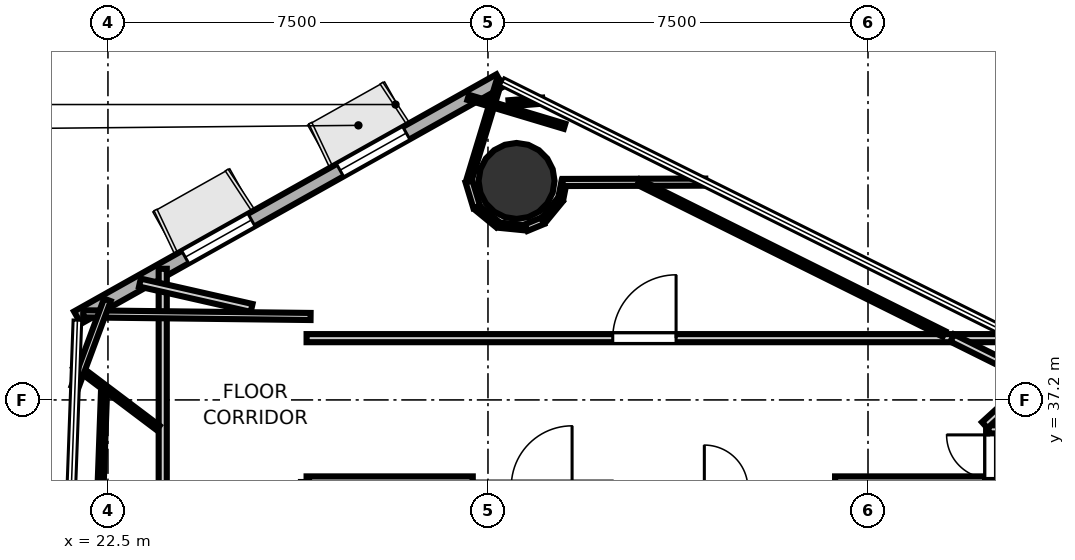
"""IFC4 building model, lengths in metres.
Left out: names, types, materials, properties, quantities, classifications, styles, units other than length and angle.
Written with IfcOpenShell. Run it as: python <this file> out.ifc"""

import sys

from ifc_helpers import new_model, si_unit, direction, frame, frame_2d, origin, origin_2d, place, context, subcontext, project, spatial, rectangle, hollow_circle, extrude, element, fill, save


model = new_model("IFC4")
c1 = context("Model", 3, precision=1e-05, world=origin(), true_north=direction((0.0, 1.0)))
c2 = subcontext(c1, "Body", "Model", "MODEL_VIEW")
j1 = project(units=[si_unit("LENGTHUNIT", "METRE"), si_unit("PLANEANGLEUNIT", "RADIAN")], contexts=[c1])
p1 = place(None, origin())
s1 = spatial("IfcSite", under=j1, at=p1, CompositionType="ELEMENT")
p2 = place(p1, origin())
s2 = spatial("IfcBuilding", under=s1, at=p2, CompositionType="ELEMENT")
p3 = place(p2, frame((0.0, 0.0, 134.8)))
s3 = spatial("IfcBuildingStorey", under=s2, at=p3, CompositionType="ELEMENT", Elevation=134.8)
p4 = place(p3, frame((30.564, 41.521, 0.0), z_axis=(0.0, 0.0, 1.0), x_axis=(1.0, 0.0, 0.0)))
e1 = element("IfcColumn", 1, at=p4, inside=s3, PredefinedType="COLUMN", context=c2, shape_type="SweptSolid", body=[
    extrude(hollow_circle(Radius=0.75, WallThickness=0.036, at=origin_2d()), origin(), (0.0, 0.0, 1.0), 3.7),
])
p5 = place(p3, frame((30.235, 43.503, 0.0), z_axis=(0.0, 0.0, 1.0), x_axis=(-0.872027391353, -0.489457075473, 0.0)))
e2 = element("IfcWall", 2, at=p5, inside=s3, PredefinedType="SOLIDWALL", context=c2, shape_type="SweptSolid", body=[
    extrude(rectangle(XDim=9.559, YDim=0.28, at=frame_2d((4.78, 0.0))), origin(), (0.0, 0.0, 1.0), 3.4),
])
p6 = place(p5, frame((2.118, 0.0, 0.85)))
e3 = element("IfcOpeningElement", 3, at=p6, cuts=e2, PredefinedType="OPENING", context=c2, shape_type="SweptSolid", body=[
    extrude(rectangle(XDim=1.5, YDim=2.1, at=frame_2d((0.75, 1.05))), frame((0.0, 0.15, 0.0), z_axis=(0.0, -1.0, 0.0), x_axis=(1.0, 0.0, 0.0)), (0.0, 0.0, 1.0), 0.3),
])
p7 = place(p5, frame((5.621, 0.0, 0.85)))
e4 = element("IfcOpeningElement", 4, at=p7, cuts=e2, PredefinedType="OPENING", context=c2, shape_type="SweptSolid", body=[
    extrude(rectangle(XDim=1.5, YDim=2.1, at=frame_2d((0.75, 1.05))), frame((0.0, 0.15, 0.0), z_axis=(0.0, -1.0, 0.0), x_axis=(1.0, 0.0, 0.0)), (0.0, 0.0, 1.0), 0.3),
])
p8 = place(p3, frame((39.911, 32.64, 0.0), z_axis=(0.0, 0.0, 1.0), x_axis=(0.0, 1.0, 0.0)))
e5 = element("IfcWall", 5, at=p8, inside=s3, PredefinedType="PARTITIONING", context=c2, shape_type="SweptSolid", body=[
    extrude(rectangle(XDim=4.01, YDim=0.16, at=frame_2d((2.005, 0.0))), origin(), (0.0, 0.0, 1.0), 2.72),
])
p9 = place(p8, frame((3.01, 0.0, 0.0)))
e6 = element("IfcOpeningElement", 6, at=p9, cuts=e5, PredefinedType="OPENING", context=c2, shape_type="SweptSolid", body=[
    extrude(rectangle(XDim=0.86, YDim=2.05, at=frame_2d((0.43, 1.025))), frame((0.0, 0.09, 0.0), z_axis=(0.0, -1.0, 0.0), x_axis=(1.0, 0.0, 0.0)), (0.0, 0.0, 1.0), 0.18),
])
p10 = place(p3, frame((39.88, 36.619, 0.0), z_axis=(0.0, 0.0, 1.0), x_axis=(1.0, 0.0, 0.0)))
e7 = element("IfcWall", 7, at=p10, inside=s3, PredefinedType="PARTITIONING", context=c2, shape_type="SweptSolid", body=[
    extrude(rectangle(XDim=4.223, YDim=0.16, at=frame_2d((2.111, 0.0))), origin(), (0.0, 0.0, 1.0), 2.72),
])
p11 = place(p3, frame((23.581, 28.307, 0.0), z_axis=(0.0, 0.0, 1.0), x_axis=(0.0, 1.0, 0.0)))
e8 = element("IfcWall", 8, at=p11, inside=s3, PredefinedType="PARTITIONING", context=c2, shape_type="SweptSolid", body=[
    extrude(rectangle(XDim=11.481, YDim=0.16, at=frame_2d((5.741, 0.0))), origin(), (0.0, 0.0, 1.0), 2.72),
])
p12 = place(p11, frame((3.909, 0.0, 0.0)))
e9 = element("IfcOpeningElement", 9, at=p12, cuts=e8, PredefinedType="OPENING", context=c2, shape_type="SweptSolid", body=[
    extrude(rectangle(XDim=1.25, YDim=2.2, at=frame_2d((0.625, 1.1))), frame((0.0, 0.09, 0.0), z_axis=(0.0, -1.0, 0.0), x_axis=(1.0, 0.0, 0.0)), (0.0, 0.0, 1.0), 0.18),
])
p13 = place(p3, frame((23.131, 39.515, 0.0), z_axis=(0.0, 0.0, 1.0), x_axis=(0.97520389142, -0.22130831471, 0.0)))
e10 = element("IfcWall", 10, at=p13, inside=s3, PredefinedType="PARTITIONING", context=c2, shape_type="SweptSolid", body=[
    extrude(rectangle(XDim=2.26, YDim=0.16, at=frame_2d((1.13, 0.0))), origin(), (0.0, 0.0, 1.0), 2.72),
])
p14 = place(p3, frame((26.42, 38.419, 0.0), z_axis=(0.0, 0.0, 1.0), x_axis=(1.0, 0.0, 0.0)))
e11 = element("IfcWall", 11, at=p14, inside=s3, PredefinedType="PARTITIONING", context=c2, shape_type="SweptSolid", body=[
    extrude(rectangle(XDim=14.062, YDim=0.16, at=frame_2d((7.031, 0.0))), origin(), (0.0, 0.0, 1.0), 2.72),
])
p15 = place(p14, frame((6.042, 0.0, 0.0)))
e12 = element("IfcOpeningElement", 12, at=p15, cuts=e11, PredefinedType="OPENING", context=c2, shape_type="SweptSolid", body=[
    extrude(rectangle(XDim=1.25, YDim=2.2, at=frame_2d((0.625, 1.1))), frame((0.0, 0.09, 0.0), z_axis=(0.0, -1.0, 0.0), x_axis=(1.0, 0.0, 0.0)), (0.0, 0.0, 1.0), 0.18),
])
p16 = place(p3, frame((39.161, 38.422, 0.0), z_axis=(0.0, 0.0, 1.0), x_axis=(0.895492718696, -0.445076162878, 0.0)))
e13 = element("IfcWall", 13, at=p16, inside=s3, PredefinedType="PARTITIONING", context=c2, shape_type="SweptSolid", body=[
    extrude(rectangle(XDim=1.874, YDim=0.16, at=frame_2d((0.937, 0.0))), origin(), (0.0, 0.0, 1.0), 2.72),
])
p17 = place(p3, frame((41.271, 38.038, 0.0), z_axis=(0.0, 0.0, 1.0), x_axis=(-0.739271241346, -0.673407775214, 0.0)))
e14 = element("IfcWall", 14, at=p17, inside=s3, PredefinedType="PARTITIONING", context=c2, shape_type="SweptSolid", body=[
    extrude(rectangle(XDim=1.983, YDim=0.16, at=frame_2d((0.992, 0.0))), origin(), (0.0, 0.0, 1.0), 2.72),
])
p18 = place(p3, frame((39.818, 35.611, 0.0), z_axis=(0.0, 0.0, 1.0), x_axis=(-1.0, 0.0, 0.0)))
e15 = element("IfcWall", 15, at=p18, inside=s3, PredefinedType="PARTITIONING", context=c2, shape_type="SweptSolid", body=[
    extrude(rectangle(XDim=2.968, YDim=0.16, at=frame_2d((1.484, 0.0))), origin(), (0.0, 0.0, 1.0), 2.72),
])
p19 = place(p3, frame((29.7, 35.611, 0.0), z_axis=(0.0, 0.0, 1.0), x_axis=(-1.0, 0.0, 0.0)))
e16 = element("IfcWall", 16, at=p19, inside=s3, PredefinedType="PARTITIONING", context=c2, shape_type="SweptSolid", body=[
    extrude(rectangle(XDim=3.28, YDim=0.16, at=frame_2d((1.64, 0.0))), origin(), (0.0, 0.0, 1.0), 2.72),
])
p20 = place(p3, frame((26.499, 38.847, 0.0), z_axis=(0.0, 0.0, 1.0), x_axis=(-0.999932203987, 0.011644201537, 0.0)))
e17 = element("IfcWall", 17, at=p20, inside=s3, PredefinedType="PARTITIONING", context=c2, shape_type="SweptSolid", body=[
    extrude(rectangle(XDim=4.487, YDim=0.14, at=frame_2d((2.243, 0.0))), origin(), (0.0, 0.0, 1.0), 2.72),
])
p21 = place(p3, frame((23.489, 36.65, 0.0), z_axis=(0.0, 0.0, 1.0), x_axis=(-0.798656999973, 0.601786503998, 0.0)))
e18 = element("IfcWall", 18, at=p21, inside=s3, PredefinedType="PARTITIONING", context=c2, shape_type="SweptSolid", body=[
    extrude(rectangle(XDim=2.054, YDim=0.105, at=frame_2d((1.027, 0.0))), origin(), (0.0, 0.0, 1.0), 2.72),
])
p22 = place(p3, frame((21.85, 37.456, 0.0), z_axis=(0.0, 0.0, 1.0), x_axis=(0.348320249102, 0.937375593914, 0.0)))
e19 = element("IfcWall", 19, at=p22, inside=s3, PredefinedType="PARTITIONING", context=c2, shape_type="SweptSolid", body=[
    extrude(rectangle(XDim=1.833, YDim=0.14, at=frame_2d((0.917, 0.0))), origin(), (0.0, 0.0, 1.0), 2.72),
])
p23 = place(p3, frame((29.609, 43.171, 0.0), z_axis=(0.0, 0.0, 1.0), x_axis=(0.957836435748, -0.287314048305, 0.0)))
e20 = element("IfcWall", 20, at=p23, inside=s3, PredefinedType="PARTITIONING", context=c2, shape_type="SweptSolid", body=[
    extrude(rectangle(XDim=1.986, YDim=0.105, at=frame_2d((0.993, 0.0))), origin(), (0.0, 0.0, 1.0), 2.72),
])
p24 = place(p3, frame((31.074, 43.106, 0.0), z_axis=(0.0, 0.0, 1.0), x_axis=(-0.996901924198, -0.07865464723, 0.0)))
e21 = element("IfcWall", 21, at=p24, inside=s3, PredefinedType="PARTITIONING", context=c2, shape_type="SweptSolid", body=[
    extrude(rectangle(XDim=0.667, YDim=0.12, at=frame_2d((0.333, 0.0))), origin(), (0.0, 0.0, 1.0), 2.72),
])
p25 = place(p3, frame((30.226, 43.514, 0.0), z_axis=(0.0, 0.0, 1.0), x_axis=(-0.290360314868, -0.956917388049, 0.0)))
e22 = element("IfcWall", 22, at=p25, inside=s3, PredefinedType="PARTITIONING", context=c2, shape_type="SweptSolid", body=[
    extrude(rectangle(XDim=2.073, YDim=0.105, at=frame_2d((1.037, 0.0))), origin(), (0.0, 0.0, 1.0), 2.72),
])
p26 = place(p3, frame((29.624, 41.512, 0.0), z_axis=(0.0, 0.0, 1.0), x_axis=(0.290186937255, -0.956969979386, 0.0)))
e23 = element("IfcWall", 23, at=p26, inside=s3, PredefinedType="PARTITIONING", context=c2, shape_type="SweptSolid", body=[
    extrude(rectangle(XDim=0.528, YDim=0.14, at=frame_2d((0.264, 0.0))), origin(), (0.0, 0.0, 1.0), 2.72),
])
p27 = place(p3, frame((29.788, 40.991, 0.0), z_axis=(0.0, 0.0, 1.0), x_axis=(0.773009460249, -0.634394494275, 0.0)))
e24 = element("IfcWall", 24, at=p27, inside=s3, PredefinedType="PARTITIONING", context=c2, shape_type="SweptSolid", body=[
    extrude(rectangle(XDim=0.528, YDim=0.12, at=frame_2d((0.264, 0.0))), origin(), (0.0, 0.0, 1.0), 2.72),
])
p28 = place(p3, frame((30.213, 40.649, 0.0), z_axis=(0.0, 0.0, 1.0), x_axis=(0.995191506225, -0.09794828195, 0.0)))
e25 = element("IfcWall", 25, at=p28, inside=s3, PredefinedType="PARTITIONING", context=c2, shape_type="SweptSolid", body=[
    extrude(rectangle(XDim=0.528, YDim=0.105, at=frame_2d((0.264, 0.0))), origin(), (0.0, 0.0, 1.0), 2.72),
])
p29 = place(p3, frame((30.753, 40.6, 0.0), z_axis=(0.0, 0.0, 1.0), x_axis=(0.923949766891, 0.382513827544, 0.0)))
e26 = element("IfcWall", 26, at=p29, inside=s3, PredefinedType="PARTITIONING", context=c2, shape_type="SweptSolid", body=[
    extrude(rectangle(XDim=0.355, YDim=0.14, at=frame_2d((0.177, 0.0))), origin(), (0.0, 0.0, 1.0), 2.72),
])
p30 = place(p3, frame((31.094, 40.745, 0.0), z_axis=(0.0, 0.0, 1.0), x_axis=(0.634394494275, 0.773009460249, 0.0)))
e27 = element("IfcWall", 27, at=p30, inside=s3, PredefinedType="PARTITIONING", context=c2, shape_type="SweptSolid", body=[
    extrude(rectangle(XDim=0.528, YDim=0.12, at=frame_2d((0.264, 0.0))), origin(), (0.0, 0.0, 1.0), 2.72),
])
p31 = place(p3, frame((31.435, 41.167, 0.0), z_axis=(0.0, 0.0, 1.0), x_axis=(0.19466594417, 0.980869598968, 0.0)))
e28 = element("IfcWall", 28, at=p31, inside=s3, PredefinedType="PARTITIONING", context=c2, shape_type="SweptSolid", body=[
    extrude(rectangle(XDim=0.356, YDim=0.105, at=frame_2d((0.178, 0.0))), origin(), (0.0, 0.0, 1.0), 2.72),
])
p32 = place(p3, frame((31.474, 41.491, 0.0), z_axis=(0.0, 0.0, 1.0), x_axis=(0.99999683476, 0.002516042704, 0.0)))
e29 = element("IfcWall", 29, at=p32, inside=s3, PredefinedType="PARTITIONING", context=c2, shape_type="SweptSolid", body=[
    extrude(rectangle(XDim=2.814, YDim=0.14, at=frame_2d((1.407, 0.0))), origin(), (0.0, 0.0, 1.0), 2.72),
])
p33 = place(p3, frame((32.974, 41.498, 0.0), z_axis=(0.0, 0.0, 1.0), x_axis=(0.895455077004, -0.445151889885, 0.0)))
e30 = element("IfcWall", 30, at=p33, inside=s3, PredefinedType="PARTITIONING", context=c2, shape_type="SweptSolid", body=[
    extrude(rectangle(XDim=6.73, YDim=0.12, at=frame_2d((3.365, 0.0))), origin(), (0.0, 0.0, 1.0), 2.72),
])
p34 = place(p3, frame((22.078, 27.882, 0.0), z_axis=(0.0, 0.0, 1.0), x_axis=(0.036297429343, 0.999341031192, 0.0)))
e31 = element("IfcWall", 31, at=p34, inside=s3, PredefinedType="PARTITIONING", context=c2, shape_type="SweptSolid", body=[
    extrude(rectangle(XDim=9.457, YDim=0.12, at=frame_2d((4.729, 0.0))), origin(), (0.0, 0.0, 1.0), 2.72),
])
p35 = place(p9, origin())
e32 = element("IfcDoor", 32, at=p35, inside=s3, OperationType="SINGLE_SWING_RIGHT", PredefinedType="DOOR", context=c2, shape_type="SweptSolid", body=[
    extrude(rectangle(XDim=0.86, YDim=2.05, at=frame_2d((0.43, 1.025))), frame((0.0, 0.025, 0.0), z_axis=(0.0, -1.0, 0.0), x_axis=(1.0, 0.0, 0.0)), (0.0, 0.0, 1.0), 0.05),
])
fill(e6, e32)
p36 = place(p15, origin())
e33 = element("IfcDoor", 33, at=p36, inside=s3, OperationType="SINGLE_SWING_RIGHT", PredefinedType="DOOR", context=c2, shape_type="SweptSolid", body=[
    extrude(rectangle(XDim=1.25, YDim=2.2, at=frame_2d((0.625, 1.1))), frame((0.0, 0.025, 0.0), z_axis=(0.0, -1.0, 0.0), x_axis=(1.0, 0.0, 0.0)), (0.0, 0.0, 1.0), 0.05),
])
fill(e12, e33)
p37 = place(p6, origin())
e34 = element("IfcWindow", 34, at=p37, inside=s3, PartitioningType="SINGLE_PANEL", PredefinedType="WINDOW", context=c2, shape_type="SweptSolid", body=[
    extrude(rectangle(XDim=1.5, YDim=2.1, at=frame_2d((0.75, 1.05))), frame((0.0, 0.03, 0.0), z_axis=(0.0, -1.0, 0.0), x_axis=(1.0, 0.0, 0.0)), (0.0, 0.0, 1.0), 0.06),
])
fill(e3, e34)
p38 = place(p7, origin())
e35 = element("IfcWindow", 35, at=p38, inside=s3, PartitioningType="SINGLE_PANEL", PredefinedType="WINDOW", context=c2, shape_type="SweptSolid", body=[
    extrude(rectangle(XDim=1.5, YDim=2.1, at=frame_2d((0.75, 1.05))), frame((0.0, 0.03, 0.0), z_axis=(0.0, -1.0, 0.0), x_axis=(1.0, 0.0, 0.0)), (0.0, 0.0, 1.0), 0.06),
])
fill(e4, e35)
save(model, sys.argv[1])
